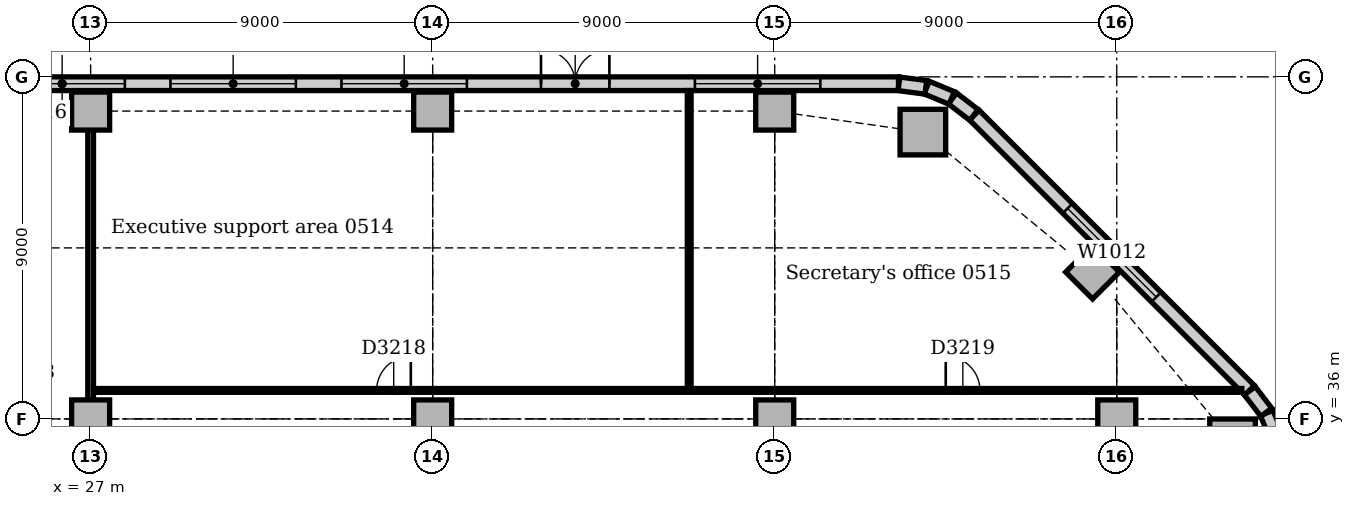
"""IFC4 building model, lengths in metres.
Left out: names, types, materials, properties, quantities, classifications, styles, units other than length and angle.
Written with IfcOpenShell. Run it as: python <this file> out.ifc"""

import sys

from ifc_helpers import new_model, si_unit, direction, frame, frame_2d, origin, origin_2d, place, context, subcontext, project, spatial, rectangle, extrude, element, fill, save


model = new_model("IFC4")
c1 = context("Model", 3, precision=1e-05, world=origin(), true_north=direction((0.0, 1.0)))
c2 = subcontext(c1, "Body", "Model", "MODEL_VIEW")
j1 = project(units=[si_unit("LENGTHUNIT", "METRE"), si_unit("PLANEANGLEUNIT", "RADIAN")], contexts=[c1])
p1 = place(None, origin())
s1 = spatial("IfcSite", under=j1, at=p1, CompositionType="ELEMENT")
p2 = place(p1, origin())
s2 = spatial("IfcBuilding", under=s1, at=p2, CompositionType="ELEMENT")
p3 = place(p2, frame((0.0, 0.0, 26.0)))
s3 = spatial("IfcBuildingStorey", under=s2, at=p3, CompositionType="ELEMENT", Elevation=26.0)
for number, where, z_axis, x_axis in (
    (1, (57.047, 35.398, 0.0), (0.0, 0.0, 1.0), (1.0, 0.0, 0.0)),
    (2, (48.898, 43.547, 0.0), (0.0, 0.0, 1.0), (1.0, 0.0, 0.0)),
):
    element("IfcColumn", number, at=place(p3, frame(where, z_axis=z_axis, x_axis=x_axis)), inside=s3, PredefinedType="COLUMN", context=c2, shape_type="SweptSolid", body=[
        extrude(rectangle(XDim=1.2, YDim=1.2, at=origin_2d()), origin(), (0.0, 0.0, 1.0), 3.85),
    ])
for number, where, z_axis, x_axis in (
    (3, (53.364, 39.864, 0.0), (0.0, 0.0, 1.0), (0.707, 0.707, 0.0)),
    (4, (27.0, 44.1, 0.0), (0.0, 0.0, 1.0), (1.0, 0.0, 0.0)),
    (5, (36.0, 44.1, 0.0), (0.0, 0.0, 1.0), (1.0, 0.0, 0.0)),
    (6, (45.0, 44.1, 0.0), (0.0, 0.0, 1.0), (1.0, 0.0, 0.0)),
    (7, (27.0, 36.0, 0.0), (0.0, 0.0, 1.0), (1.0, 0.0, 0.0)),
    (8, (36.0, 36.0, 0.0), (0.0, 0.0, 1.0), (1.0, 0.0, 0.0)),
    (9, (45.0, 36.0, 0.0), (0.0, 0.0, 1.0), (1.0, 0.0, 0.0)),
    (10, (54.0, 36.0, 0.0), (0.0, 0.0, 1.0), (1.0, 0.0, 0.0)),
):
    element("IfcColumn", number, at=place(p3, frame(where, z_axis=z_axis, x_axis=x_axis)), inside=s3, PredefinedType="COLUMN", context=c2, shape_type="SweptSolid", body=[
        extrude(rectangle(XDim=1.0, YDim=1.0, at=origin_2d()), origin(), (0.0, 0.0, 1.0), 3.85),
    ])
p4 = place(p3, frame((57.494, 36.751, 0.0), z_axis=(0.0, 0.0, 1.0), x_axis=(-0.707106781187, 0.707106781187, 0.0)))
e11 = element("IfcWall", 11, at=p4, inside=s3, PredefinedType="STANDARD", context=c2, shape_type="SweptSolid", body=[
    extrude(rectangle(XDim=10.243, YDim=0.36, at=frame_2d((5.121, 0.0))), origin(), (0.0, 0.0, 1.0), 3.85),
])
p5 = place(p4, frame((3.471, 0.0, 0.9)))
e12 = element("IfcOpeningElement", 12, at=p5, cuts=e11, PredefinedType="OPENING", context=c2, shape_type="SweptSolid", body=[
    extrude(rectangle(XDim=3.3, YDim=1.6, at=frame_2d((1.65, 0.8))), frame((0.0, 0.19, 0.0), z_axis=(0.0, -1.0, 0.0), x_axis=(1.0, 0.0, 0.0)), (0.0, 0.0, 1.0), 0.38),
])
p6 = place(p3, frame((48.257, 44.82, 0.0), z_axis=(0.0, 0.0, 1.0), x_axis=(-1.0, 0.0, 0.0)))
e13 = element("IfcWall", 13, at=p6, inside=s3, PredefinedType="STANDARD", context=c2, shape_type="SweptSolid", body=[
    extrude(rectangle(XDim=44.015, YDim=0.36, at=frame_2d((22.007, 0.0))), origin(), (0.0, 0.0, 1.0), 3.85),
])
p7 = place(p6, frame((2.057, 0.0, 0.9)))
e14 = element("IfcOpeningElement", 14, at=p7, cuts=e13, PredefinedType="OPENING", context=c2, shape_type="SweptSolid", body=[
    extrude(rectangle(XDim=3.3, YDim=1.6, at=frame_2d((1.65, 0.8))), frame((0.0, 0.19, 0.0), z_axis=(0.0, -1.0, 0.0), x_axis=(1.0, 0.0, 0.0)), (0.0, 0.0, 1.0), 0.38),
])
p8 = place(p6, frame((7.607, 0.0, 0.0)))
e15 = element("IfcOpeningElement", 15, at=p8, cuts=e13, PredefinedType="OPENING", context=c2, shape_type="SweptSolid", body=[
    extrude(rectangle(XDim=1.8, YDim=2.4, at=frame_2d((0.9, 1.2))), frame((0.0, 0.19, 0.0), z_axis=(0.0, -1.0, 0.0), x_axis=(1.0, 0.0, 0.0)), (0.0, 0.0, 1.0), 0.38),
])
p9 = place(p6, frame((11.357, 0.0, 0.9)))
e16 = element("IfcOpeningElement", 16, at=p9, cuts=e13, PredefinedType="OPENING", context=c2, shape_type="SweptSolid", body=[
    extrude(rectangle(XDim=3.3, YDim=1.6, at=frame_2d((1.65, 0.8))), frame((0.0, 0.19, 0.0), z_axis=(0.0, -1.0, 0.0), x_axis=(1.0, 0.0, 0.0)), (0.0, 0.0, 1.0), 0.38),
])
p10 = place(p6, frame((15.857, 0.0, 0.9)))
e17 = element("IfcOpeningElement", 17, at=p10, cuts=e13, PredefinedType="OPENING", context=c2, shape_type="SweptSolid", body=[
    extrude(rectangle(XDim=3.3, YDim=1.6, at=frame_2d((1.65, 0.8))), frame((0.0, 0.19, 0.0), z_axis=(0.0, -1.0, 0.0), x_axis=(1.0, 0.0, 0.0)), (0.0, 0.0, 1.0), 0.38),
])
p11 = place(p6, frame((20.357, 0.0, 0.9)))
e18 = element("IfcOpeningElement", 18, at=p11, cuts=e13, PredefinedType="OPENING", context=c2, shape_type="SweptSolid", body=[
    extrude(rectangle(XDim=3.3, YDim=1.6, at=frame_2d((1.65, 0.8))), frame((0.0, 0.19, 0.0), z_axis=(0.0, -1.0, 0.0), x_axis=(1.0, 0.0, 0.0)), (0.0, 0.0, 1.0), 0.38),
])
p12 = place(p6, frame((25.957, 0.0, 0.9)))
e19 = element("IfcOpeningElement", 19, at=p12, cuts=e13, PredefinedType="OPENING", context=c2, shape_type="SweptSolid", body=[
    extrude(rectangle(XDim=1.8, YDim=1.6, at=frame_2d((0.9, 0.8))), frame((0.0, 0.19, 0.0), z_axis=(0.0, -1.0, 0.0), x_axis=(1.0, 0.0, 0.0)), (0.0, 0.0, 1.0), 0.38),
])
p13 = place(p6, frame((29.357, 0.0, 0.9)))
e20 = element("IfcOpeningElement", 20, at=p13, cuts=e13, PredefinedType="OPENING", context=c2, shape_type="SweptSolid", body=[
    extrude(rectangle(XDim=3.3, YDim=1.6, at=frame_2d((1.65, 0.8))), frame((0.0, 0.19, 0.0), z_axis=(0.0, -1.0, 0.0), x_axis=(1.0, 0.0, 0.0)), (0.0, 0.0, 1.0), 0.38),
])
p14 = place(p6, frame((33.857, 0.0, 0.9)))
e21 = element("IfcOpeningElement", 21, at=p14, cuts=e13, PredefinedType="OPENING", context=c2, shape_type="SweptSolid", body=[
    extrude(rectangle(XDim=3.3, YDim=1.6, at=frame_2d((1.65, 0.8))), frame((0.0, 0.19, 0.0), z_axis=(0.0, -1.0, 0.0), x_axis=(1.0, 0.0, 0.0)), (0.0, 0.0, 1.0), 0.38),
])
p15 = place(p6, frame((38.357, 0.0, 0.9)))
e22 = element("IfcOpeningElement", 22, at=p15, cuts=e13, PredefinedType="OPENING", context=c2, shape_type="SweptSolid", body=[
    extrude(rectangle(XDim=3.3, YDim=1.6, at=frame_2d((1.65, 0.8))), frame((0.0, 0.19, 0.0), z_axis=(0.0, -1.0, 0.0), x_axis=(1.0, 0.0, 0.0)), (0.0, 0.0, 1.0), 0.38),
])
p16 = place(p3, frame((58.218, 35.497, 0.0), z_axis=(0.0, 0.0, 1.0), x_axis=(-0.382702709855, 0.923871547278, 0.0)))
e23 = element("IfcWall", 23, at=p16, inside=s3, PredefinedType="STANDARD", context=c2, shape_type="SweptSolid", body=[
    extrude(rectangle(XDim=0.713, YDim=0.36, at=frame_2d((0.356, 0.0))), origin(), (0.0, 0.0, 1.0), 3.85),
])
for number, where, z_axis, x_axis in (
    (24, (57.934, 36.175, 0.0), (0.0, 0.0, 1.0), (-0.609, 0.793, 0.0)),
    (25, (50.241, 44.0, 0.0), (0.0, 0.0, 1.0), (-0.793, 0.609, 0.0)),
):
    element("IfcWall", number, at=place(p3, frame(where, z_axis=z_axis, x_axis=x_axis)), inside=s3, PredefinedType="STANDARD", context=c2, shape_type="SweptSolid", body=[
        extrude(rectangle(XDim=0.713, YDim=0.36, at=frame_2d((0.357, 0.0))), origin(), (0.0, 0.0, 1.0), 3.85),
    ])
for number, where, z_axis, x_axis in (
    (26, (49.656, 44.445, 0.0), (0.0, 0.0, 1.0), (-0.924, 0.383, 0.0)),
    (27, (48.976, 44.724, 0.0), (0.0, 0.0, 1.0), (-0.991, 0.131, 0.0)),
):
    element("IfcWall", number, at=place(p3, frame(where, z_axis=z_axis, x_axis=x_axis)), inside=s3, PredefinedType="STANDARD", context=c2, shape_type="SweptSolid", body=[
        extrude(rectangle(XDim=0.713, YDim=0.36, at=frame_2d((0.356, 0.0))), origin(), (0.0, 0.0, 1.0), 3.85),
    ])
p17 = place(p3, frame((27.0, 36.5, 0.0), z_axis=(0.0, 0.0, 1.0), x_axis=(0.0, 1.0, 0.0)))
e28 = element("IfcWall", 28, at=p17, inside=s3, PredefinedType="PARTITIONING", context=c2, shape_type="SweptSolid", body=[
    extrude(rectangle(XDim=7.1, YDim=0.15, at=frame_2d((3.55, 0.0))), origin(), (0.0, 0.0, 1.0), 3.158),
])
p18 = place(p3, frame((27.075, 36.75, 0.0), z_axis=(0.0, 0.0, 1.0), x_axis=(1.0, 0.0, 0.0)))
e29 = element("IfcWall", 29, at=p18, inside=s3, PredefinedType="PARTITIONING", context=c2, shape_type="SweptSolid", body=[
    extrude(rectangle(XDim=30.216, YDim=0.1, at=frame_2d((15.108, 0.0))), origin(), (0.0, 0.0, 1.0), 3.85),
])
p19 = place(p18, frame((7.45, 0.0, 0.0)))
e30 = element("IfcOpeningElement", 30, at=p19, cuts=e29, PredefinedType="OPENING", context=c2, shape_type="SweptSolid", body=[
    extrude(rectangle(XDim=0.9, YDim=2.1, at=frame_2d((0.45, 1.05))), frame((0.0, 0.06, 0.0), z_axis=(0.0, -1.0, 0.0), x_axis=(1.0, 0.0, 0.0)), (0.0, 0.0, 1.0), 0.12),
])
p20 = place(p18, frame((22.425, 0.0, 0.0)))
e31 = element("IfcOpeningElement", 31, at=p20, cuts=e29, PredefinedType="OPENING", context=c2, shape_type="SweptSolid", body=[
    extrude(rectangle(XDim=0.9, YDim=2.1, at=frame_2d((0.45, 1.05))), frame((0.0, 0.06, 0.0), z_axis=(0.0, -1.0, 0.0), x_axis=(1.0, 0.0, 0.0)), (0.0, 0.0, 1.0), 0.12),
])
p21 = place(p3, frame((42.75, 36.8, 0.0), z_axis=(0.0, 0.0, 1.0), x_axis=(0.0, 1.0, 0.0)))
e32 = element("IfcWall", 32, at=p21, inside=s3, PredefinedType="PARTITIONING", context=c2, shape_type="SweptSolid", body=[
    extrude(rectangle(XDim=7.84, YDim=0.1, at=frame_2d((3.92, 0.0))), origin(), (0.0, 0.0, 1.0), 3.85),
])
p22 = place(p5, origin())
e33 = element("IfcWindow", 33, at=p22, inside=s3, PartitioningType="SINGLE_PANEL", PredefinedType="WINDOW", context=c2, shape_type="SweptSolid", body=[
    extrude(rectangle(XDim=3.3, YDim=1.6, at=frame_2d((1.65, 0.8))), frame((0.0, 0.13, 0.0), z_axis=(0.0, -1.0, 0.0), x_axis=(1.0, 0.0, 0.0)), (0.0, 0.0, 1.0), 0.06),
])
fill(e12, e33)
p23 = place(p7, origin())
e34 = element("IfcWindow", 34, at=p23, inside=s3, PartitioningType="SINGLE_PANEL", PredefinedType="WINDOW", context=c2, shape_type="SweptSolid", body=[
    extrude(rectangle(XDim=3.3, YDim=1.6, at=frame_2d((1.65, 0.8))), frame((0.0, 0.13, 0.0), z_axis=(0.0, -1.0, 0.0), x_axis=(1.0, 0.0, 0.0)), (0.0, 0.0, 1.0), 0.06),
])
fill(e14, e34)
p24 = place(p8, frame((1.8, 0.0, 0.0), z_axis=(0.0, 0.0, 1.0), x_axis=(-1.0, 0.0, 0.0)))
e35 = element("IfcDoor", 35, at=p24, inside=s3, OperationType="DOUBLE_DOOR_SINGLE_SWING", PredefinedType="DOOR", context=c2, shape_type="SweptSolid", body=[
    extrude(rectangle(XDim=1.8, YDim=2.4, at=frame_2d((0.9, 1.2))), frame((0.0, -0.07, 0.0), z_axis=(0.0, -1.0, 0.0), x_axis=(1.0, 0.0, 0.0)), (0.0, 0.0, 1.0), 0.05),
])
fill(e15, e35)
p25 = place(p9, origin())
e36 = element("IfcWindow", 36, at=p25, inside=s3, PartitioningType="SINGLE_PANEL", PredefinedType="WINDOW", context=c2, shape_type="SweptSolid", body=[
    extrude(rectangle(XDim=3.3, YDim=1.6, at=frame_2d((1.65, 0.8))), frame((0.0, 0.13, 0.0), z_axis=(0.0, -1.0, 0.0), x_axis=(1.0, 0.0, 0.0)), (0.0, 0.0, 1.0), 0.06),
])
fill(e16, e36)
p26 = place(p10, origin())
e37 = element("IfcWindow", 37, at=p26, inside=s3, PartitioningType="SINGLE_PANEL", PredefinedType="WINDOW", context=c2, shape_type="SweptSolid", body=[
    extrude(rectangle(XDim=3.3, YDim=1.6, at=frame_2d((1.65, 0.8))), frame((0.0, 0.13, 0.0), z_axis=(0.0, -1.0, 0.0), x_axis=(1.0, 0.0, 0.0)), (0.0, 0.0, 1.0), 0.06),
])
fill(e17, e37)
p27 = place(p11, origin())
e38 = element("IfcWindow", 38, at=p27, inside=s3, PartitioningType="SINGLE_PANEL", PredefinedType="WINDOW", context=c2, shape_type="SweptSolid", body=[
    extrude(rectangle(XDim=3.3, YDim=1.6, at=frame_2d((1.65, 0.8))), frame((0.0, 0.13, 0.0), z_axis=(0.0, -1.0, 0.0), x_axis=(1.0, 0.0, 0.0)), (0.0, 0.0, 1.0), 0.06),
])
fill(e18, e38)
p28 = place(p19, origin())
e39 = element("IfcDoor", 39, at=p28, inside=s3, OperationType="SINGLE_SWING_RIGHT", PredefinedType="DOOR", context=c2, shape_type="SweptSolid", body=[
    extrude(rectangle(XDim=0.9, YDim=2.1, at=frame_2d((0.45, 1.05))), frame((0.0, 0.025, 0.0), z_axis=(0.0, -1.0, 0.0), x_axis=(1.0, 0.0, 0.0)), (0.0, 0.0, 1.0), 0.05),
])
fill(e30, e39)
p29 = place(p20, origin())
e40 = element("IfcDoor", 40, at=p29, inside=s3, OperationType="SINGLE_SWING_LEFT", PredefinedType="DOOR", context=c2, shape_type="SweptSolid", body=[
    extrude(rectangle(XDim=0.9, YDim=2.1, at=frame_2d((0.45, 1.05))), frame((0.0, 0.025, 0.0), z_axis=(0.0, -1.0, 0.0), x_axis=(1.0, 0.0, 0.0)), (0.0, 0.0, 1.0), 0.05),
])
fill(e31, e40)
save(model, sys.argv[1])
